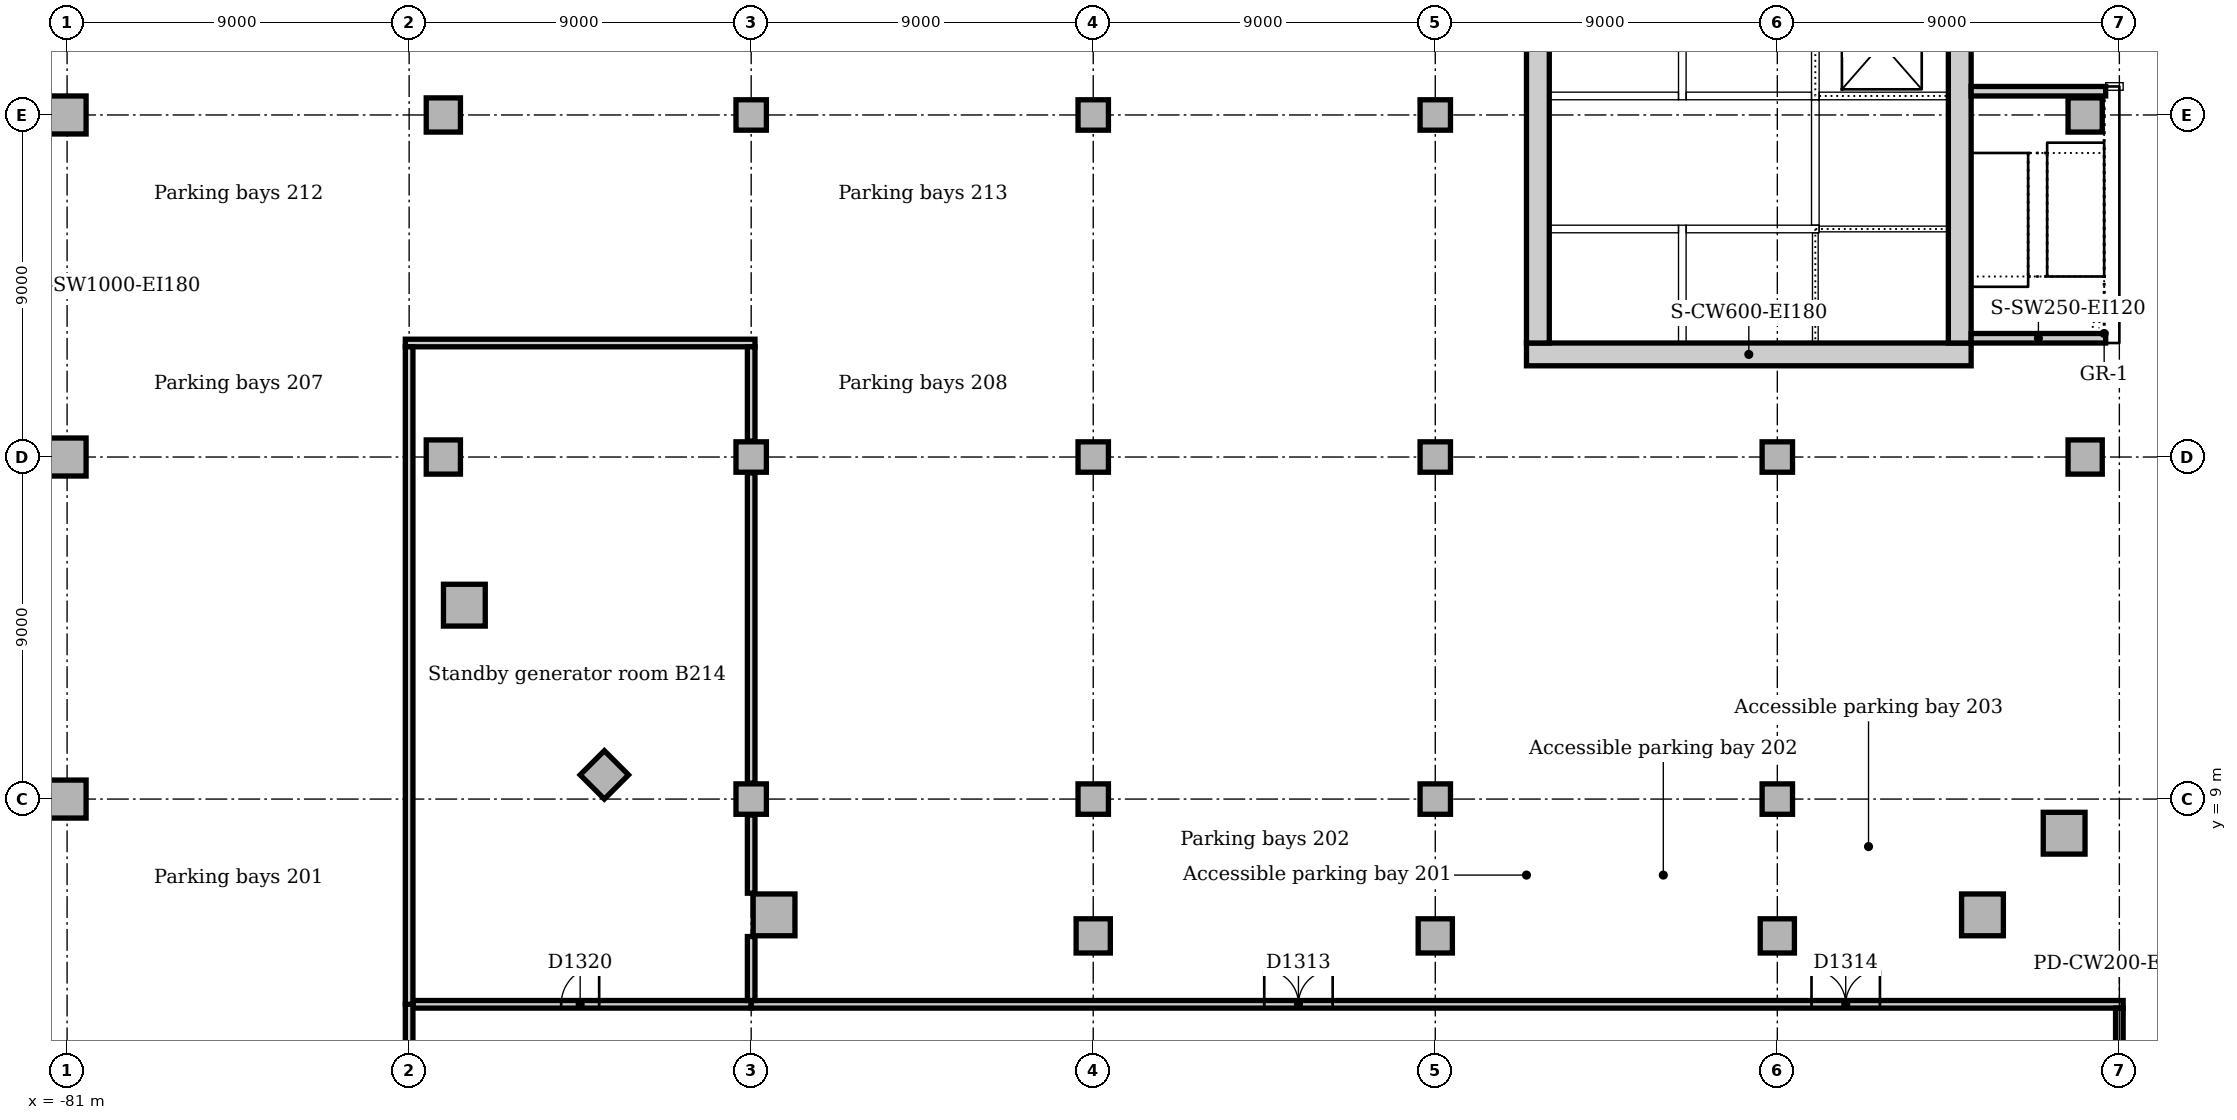
"""IFC4 building model, lengths in metres.
Left out: names, types, materials, properties, quantities, classifications, styles, units other than length and angle.
Written with IfcOpenShell. Run it as: python <this file> out.ifc"""

import sys

from ifc_helpers import new_model, si_unit, direction, frame, frame_2d, origin, origin_2d, place, context, subcontext, project, spatial, rectangle, extrude, element, fill, save


model = new_model("IFC4")
c1 = context("Model", 3, precision=1e-05, world=origin(), true_north=direction((0.0, 1.0)))
c2 = subcontext(c1, "Body", "Model", "MODEL_VIEW")
j1 = project(units=[si_unit("LENGTHUNIT", "METRE"), si_unit("PLANEANGLEUNIT", "RADIAN")], contexts=[c1])
p1 = place(None, origin())
s1 = spatial("IfcSite", under=j1, at=p1, CompositionType="ELEMENT")
p2 = place(p1, origin())
s2 = spatial("IfcBuilding", under=s1, at=p2, CompositionType="ELEMENT")
p3 = place(p2, frame((0.0, 0.0, -9.5)))
s3 = spatial("IfcBuildingStorey", under=s2, at=p3, CompositionType="ELEMENT", Elevation=-9.5)
p4 = place(p3, frame((-42.6, 20.7, 0.0), z_axis=(0.0, 0.0, 1.0), x_axis=(1.0, 0.0, 0.0)))
e1 = element("IfcWall", 1, at=p4, inside=s3, PredefinedType="SOLIDWALL", context=c2, shape_type="SweptSolid", body=[
    extrude(rectangle(XDim=11.7, YDim=0.6, at=frame_2d((5.85, 0.0))), origin(), (0.0, 0.0, 1.0), 4.5),
])
p5 = place(p3, frame((-31.2, 21.0, 0.0), z_axis=(0.0, 0.0, 1.0), x_axis=(0.0, 1.0, 0.0)))
e2 = element("IfcWall", 2, at=p5, inside=s3, PredefinedType="SOLIDWALL", context=c2, shape_type="SweptSolid", body=[
    extrude(rectangle(XDim=9.5, YDim=0.6, at=frame_2d((4.75, 0.0))), origin(), (0.0, 0.0, 1.0), 4.5),
])
p6 = place(p5, frame((5.25, 0.0, 0.0)))
e3 = element("IfcOpeningElement", 3, at=p6, cuts=e2, PredefinedType="OPENING", context=c2, shape_type="SweptSolid", body=[
    extrude(rectangle(XDim=1.0, YDim=2.1, at=frame_2d((0.5, 1.05))), frame((0.0, 0.31, 0.0), z_axis=(0.0, -1.0, 0.0), x_axis=(1.0, 0.0, 0.0)), (0.0, 0.0, 1.0), 0.62),
])
p7 = place(p3, frame((-42.3, 30.5, 0.0), z_axis=(0.0, 0.0, 1.0), x_axis=(0.0, -1.0, 0.0)))
e4 = element("IfcWall", 4, at=p7, inside=s3, PredefinedType="SOLIDWALL", context=c2, shape_type="SweptSolid", body=[
    extrude(rectangle(XDim=9.5, YDim=0.6, at=frame_2d((4.75, 0.0))), origin(), (0.0, 0.0, 1.0), 4.5),
])
p8 = place(p3, frame((-30.9, 21.125, 0.0), z_axis=(0.0, 0.0, 1.0), x_axis=(1.0, 0.0, 0.0)))
e5 = element("IfcWall", 5, at=p8, inside=s3, PredefinedType="SOLIDWALL", context=c2, shape_type="SweptSolid", body=[
    extrude(rectangle(XDim=3.54, YDim=0.25, at=frame_2d((1.77, 0.0))), origin(), (0.0, 0.0, 1.0), 4.5),
])
p9 = place(p3, frame((-27.36, 27.625, 0.0), z_axis=(0.0, 0.0, 1.0), x_axis=(-1.0, 0.0, 0.0)))
e6 = element("IfcWall", 6, at=p9, inside=s3, PredefinedType="SOLIDWALL", context=c2, shape_type="SweptSolid", body=[
    extrude(rectangle(XDim=3.54, YDim=0.25, at=frame_2d((1.77, 0.0))), origin(), (0.0, 0.0, 1.0), 4.5),
])
p10 = place(p9, frame((1.69, 0.0, 0.0)))
e7 = element("IfcOpeningElement", 7, at=p10, cuts=e6, PredefinedType="OPENING", context=c2, shape_type="SweptSolid", body=[
    extrude(rectangle(XDim=1.1, YDim=2.1, at=frame_2d((0.55, 1.05))), frame((0.0, 0.135, 0.0), z_axis=(0.0, -1.0, 0.0), x_axis=(1.0, 0.0, 0.0)), (0.0, 0.0, 1.0), 0.27),
])
for number, where, z_axis, x_axis in (
    (8, (-62.398, 5.953, 0.0), (0.0, 0.0, 1.0), (1.0, 0.0, 0.0)),
    (9, (-30.602, 5.953, 0.0), (0.0, 0.0, 1.0), (1.0, 0.0, 0.0)),
    (10, (-28.453, 8.102, 0.0), (0.0, 0.0, 1.0), (1.0, 0.0, 0.0)),
    (11, (-70.547, 14.102, 0.0), (0.0, 0.0, 1.0), (1.0, 0.0, 0.0)),
):
    element("IfcColumn", number, at=place(p3, frame(where, z_axis=z_axis, x_axis=x_axis)), inside=s3, PredefinedType="COLUMN", context=c2, shape_type="SweptSolid", body=[
        extrude(rectangle(XDim=1.1, YDim=1.1, at=origin_2d()), origin(), (0.0, 0.0, 1.0), 4.15),
    ])
for number, where, z_axis, x_axis in (
    (12, (-54.0, 5.4, 0.0), (0.0, 0.0, 1.0), (1.0, 0.0, 0.0)),
    (13, (-45.0, 5.4, 0.0), (0.0, 0.0, 1.0), (1.0, 0.0, 0.0)),
    (14, (-36.0, 5.4, 0.0), (0.0, 0.0, 1.0), (1.0, 0.0, 0.0)),
    (15, (-27.9, 18.0, 0.0), (0.0, 0.0, 1.0), (1.0, 0.0, 0.0)),
):
    element("IfcColumn", number, at=place(p3, frame(where, z_axis=z_axis, x_axis=x_axis)), inside=s3, PredefinedType="COLUMN", context=c2, shape_type="SweptSolid", body=[
        extrude(rectangle(XDim=0.9, YDim=0.9, at=origin_2d()), origin(), (0.0, 0.0, 1.0), 4.15),
    ])
p11 = place(p3, frame((-27.9, 27.0, 0.0), z_axis=(0.0, 0.0, 1.0), x_axis=(1.0, 0.0, 0.0)))
e16 = element("IfcColumn", 16, at=p11, inside=s3, PredefinedType="COLUMN", context=c2, shape_type="SweptSolid", body=[
    extrude(rectangle(XDim=0.9, YDim=0.9, at=origin_2d()), origin(), (0.0, 0.0, 1.0), 4.5),
])
for number, where, z_axis, x_axis in (
    (17, (-71.1, 18.0, 0.0), (0.0, 0.0, 1.0), (1.0, 0.0, 0.0)),
    (18, (-71.1, 27.0, 0.0), (0.0, 0.0, 1.0), (1.0, 0.0, 0.0)),
    (19, (-66.864, 9.636, 0.0), (0.0, 0.0, 1.0), (0.707, 0.707, 0.0)),
):
    element("IfcColumn", number, at=place(p3, frame(where, z_axis=z_axis, x_axis=x_axis)), inside=s3, PredefinedType="COLUMN", context=c2, shape_type="SweptSolid", body=[
        extrude(rectangle(XDim=0.9, YDim=0.9, at=origin_2d()), origin(), (0.0, 0.0, 1.0), 4.15),
    ])
for number, where, z_axis, x_axis in (
    (20, (-63.0, 9.0, 0.0), (0.0, 0.0, 1.0), (1.0, 0.0, 0.0)),
    (21, (-63.0, 18.0, 0.0), (0.0, 0.0, 1.0), (1.0, 0.0, 0.0)),
    (22, (-63.0, 27.0, 0.0), (0.0, 0.0, 1.0), (1.0, 0.0, 0.0)),
    (23, (-54.0, 9.0, 0.0), (0.0, 0.0, 1.0), (1.0, 0.0, 0.0)),
    (24, (-54.0, 18.0, 0.0), (0.0, 0.0, 1.0), (1.0, 0.0, 0.0)),
    (25, (-54.0, 27.0, 0.0), (0.0, 0.0, 1.0), (1.0, 0.0, 0.0)),
    (26, (-45.0, 9.0, 0.0), (0.0, 0.0, 1.0), (1.0, 0.0, 0.0)),
    (27, (-45.0, 18.0, 0.0), (0.0, 0.0, 1.0), (1.0, 0.0, 0.0)),
    (28, (-45.0, 27.0, 0.0), (0.0, 0.0, 1.0), (1.0, 0.0, 0.0)),
    (29, (-36.0, 9.0, 0.0), (0.0, 0.0, 1.0), (1.0, 0.0, 0.0)),
    (30, (-36.0, 18.0, 0.0), (0.0, 0.0, 1.0), (1.0, 0.0, 0.0)),
):
    element("IfcColumn", number, at=place(p3, frame(where, z_axis=z_axis, x_axis=x_axis)), inside=s3, PredefinedType="COLUMN", context=c2, shape_type="SweptSolid", body=[
        extrude(rectangle(XDim=0.8, YDim=0.8, at=origin_2d()), origin(), (0.0, 0.0, 1.0), 4.15),
    ])
for number, where, z_axis, x_axis in (
    (31, (-81.0, 9.0, 0.0), (0.0, 0.0, 1.0), (1.0, 0.0, 0.0)),
    (32, (-81.0, 18.0, 0.0), (0.0, 0.0, 1.0), (1.0, 0.0, 0.0)),
    (33, (-81.0, 27.0, 0.0), (0.0, 0.0, 1.0), (1.0, 0.0, 0.0)),
):
    element("IfcColumn", number, at=place(p3, frame(where, z_axis=z_axis, x_axis=x_axis)), inside=s3, PredefinedType="COLUMN", context=c2, shape_type="SweptSolid", body=[
        extrude(rectangle(XDim=1.0, YDim=1.0, at=origin_2d()), origin(), (0.0, 0.0, 1.0), 4.15),
    ])
p12 = place(p3, frame((-71.9, 3.6, 0.0), z_axis=(0.0, 0.0, 1.0), x_axis=(1.0, 0.0, 0.0)))
e34 = element("IfcWall", 34, at=p12, inside=s3, PredefinedType="PARTITIONING", context=c2, shape_type="SweptSolid", body=[
    extrude(rectangle(XDim=8.9, YDim=0.2, at=frame_2d((4.45, 0.0))), origin(), (0.0, 0.0, 1.0), 4.15),
])
p13 = place(p12, frame((3.9, 0.0, 0.0)))
e35 = element("IfcOpeningElement", 35, at=p13, cuts=e34, PredefinedType="OPENING", context=c2, shape_type="SweptSolid", body=[
    extrude(rectangle(XDim=1.0, YDim=2.1, at=frame_2d((0.5, 1.05))), frame((0.0, 0.11, 0.0), z_axis=(0.0, -1.0, 0.0), x_axis=(1.0, 0.0, 0.0)), (0.0, 0.0, 1.0), 0.22),
])
p14 = place(p3, frame((-63.0, 3.6, 0.0), z_axis=(0.0, 0.0, 1.0), x_axis=(1.0, 0.0, 0.0)))
e36 = element("IfcWall", 36, at=p14, inside=s3, PredefinedType="PARTITIONING", context=c2, shape_type="SweptSolid", body=[
    extrude(rectangle(XDim=36.1, YDim=0.2, at=frame_2d((18.05, 0.0))), origin(), (0.0, 0.0, 1.0), 4.15),
])
p15 = place(p14, frame((13.5, 0.0, 0.0)))
e37 = element("IfcOpeningElement", 37, at=p15, cuts=e36, PredefinedType="OPENING", context=c2, shape_type="SweptSolid", body=[
    extrude(rectangle(XDim=1.8, YDim=2.1, at=frame_2d((0.9, 1.05))), frame((0.0, 0.11, 0.0), z_axis=(0.0, -1.0, 0.0), x_axis=(1.0, 0.0, 0.0)), (0.0, 0.0, 1.0), 0.22),
])
p16 = place(p14, frame((27.9, 0.0, 0.0)))
e38 = element("IfcOpeningElement", 38, at=p16, cuts=e36, PredefinedType="OPENING", context=c2, shape_type="SweptSolid", body=[
    extrude(rectangle(XDim=1.8, YDim=2.1, at=frame_2d((0.9, 1.05))), frame((0.0, 0.11, 0.0), z_axis=(0.0, -1.0, 0.0), x_axis=(1.0, 0.0, 0.0)), (0.0, 0.0, 1.0), 0.22),
])
p17 = place(p3, frame((-27.0, 0.0, 0.0), z_axis=(0.0, 0.0, 1.0), x_axis=(0.0, 1.0, 0.0)))
e39 = element("IfcWall", 39, at=p17, inside=s3, PredefinedType="PARTITIONING", context=c2, shape_type="SweptSolid", body=[
    extrude(rectangle(XDim=3.5, YDim=0.2, at=frame_2d((1.75, 0.0))), origin(), (0.0, 0.0, 1.0), 4.15),
])
p18 = place(p3, frame((-72.0, 0.52, 0.0), z_axis=(0.0, 0.0, 1.0), x_axis=(0.0, 1.0, 0.0)))
e40 = element("IfcWall", 40, at=p18, inside=s3, PredefinedType="PARTITIONING", context=c2, shape_type="SweptSolid", body=[
    extrude(rectangle(XDim=3.08, YDim=0.2, at=frame_2d((1.54, 0.0))), origin(), (0.0, 0.0, 1.0), 4.15),
])
p19 = place(p3, frame((-72.1, 21.0, 0.0), z_axis=(0.0, 0.0, 1.0), x_axis=(1.0, 0.0, 0.0)))
e41 = element("IfcWall", 41, at=p19, inside=s3, PredefinedType="PARTITIONING", context=c2, shape_type="SweptSolid", body=[
    extrude(rectangle(XDim=9.2, YDim=0.2, at=frame_2d((4.6, 0.0))), origin(), (0.0, 0.0, 1.0), 4.15),
])
p20 = place(p3, frame((-63.0, 3.7, 0.0), z_axis=(0.0, 0.0, 1.0), x_axis=(0.0, 1.0, 0.0)))
e42 = element("IfcWall", 42, at=p20, inside=s3, PredefinedType="PARTITIONING", context=c2, shape_type="SweptSolid", body=[
    extrude(rectangle(XDim=1.683, YDim=0.2, at=frame_2d((0.842, 0.0))), origin(), (0.0, 0.0, 1.0), 4.15),
])
p21 = place(p3, frame((-63.0, 6.523, 0.0), z_axis=(0.0, 0.0, 1.0), x_axis=(0.0, 1.0, 0.0)))
e43 = element("IfcWall", 43, at=p21, inside=s3, PredefinedType="PARTITIONING", context=c2, shape_type="SweptSolid", body=[
    extrude(rectangle(XDim=2.057, YDim=0.2, at=frame_2d((1.028, 0.0))), origin(), (0.0, 0.0, 1.0), 4.15),
])
p22 = place(p3, frame((-63.0, 9.42, 0.0), z_axis=(0.0, 0.0, 1.0), x_axis=(0.0, 1.0, 0.0)))
e44 = element("IfcWall", 44, at=p22, inside=s3, PredefinedType="PARTITIONING", context=c2, shape_type="SweptSolid", body=[
    extrude(rectangle(XDim=8.16, YDim=0.2, at=frame_2d((4.08, 0.0))), origin(), (0.0, 0.0, 1.0), 4.15),
])
p23 = place(p3, frame((-63.0, 18.42, 0.0), z_axis=(0.0, 0.0, 1.0), x_axis=(0.0, 1.0, 0.0)))
e45 = element("IfcWall", 45, at=p23, inside=s3, PredefinedType="PARTITIONING", context=c2, shape_type="SweptSolid", body=[
    extrude(rectangle(XDim=2.48, YDim=0.2, at=frame_2d((1.24, 0.0))), origin(), (0.0, 0.0, 1.0), 4.15),
])
p24 = place(p3, frame((-72.0, 3.6, 0.0), z_axis=(0.0, 0.0, 1.0), x_axis=(0.0, 1.0, 0.0)))
e46 = element("IfcWall", 46, at=p24, inside=s3, PredefinedType="PARTITIONING", context=c2, shape_type="SweptSolid", body=[
    extrude(rectangle(XDim=17.3, YDim=0.2, at=frame_2d((8.65, 0.0))), origin(), (0.0, 0.0, 1.0), 4.15),
])
p25 = place(p3, frame((-38.5, 21.0, 0.0), z_axis=(0.0, 0.0, 1.0), x_axis=(0.0, 1.0, 0.0)))
e47 = element("IfcWall", 47, at=p25, inside=s3, PredefinedType="SOLIDWALL", context=c2, shape_type="SweptSolid", body=[
    extrude(rectangle(XDim=3.1, YDim=0.2, at=frame_2d((1.55, 0.0))), origin(), (0.0, 0.0, 1.0), 4.5),
])
p26 = place(p3, frame((-38.6, 24.0, 0.0), z_axis=(0.0, 0.0, 1.0), x_axis=(-1.0, 0.0, 0.0)))
e48 = element("IfcWall", 48, at=p26, inside=s3, PredefinedType="SOLIDWALL", context=c2, shape_type="SweptSolid", body=[
    extrude(rectangle(XDim=3.4, YDim=0.2, at=frame_2d((1.7, 0.0))), origin(), (0.0, 0.0, 1.0), 4.5),
])
p27 = place(p3, frame((-34.9, 24.0, 0.0), z_axis=(0.0, 0.0, 1.0), x_axis=(-1.0, 0.0, 0.0)))
e49 = element("IfcWall", 49, at=p27, inside=s3, PredefinedType="SOLIDWALL", context=c2, shape_type="SweptSolid", body=[
    extrude(rectangle(XDim=3.5, YDim=0.2, at=frame_2d((1.75, 0.0))), origin(), (0.0, 0.0, 1.0), 4.5),
])
p28 = place(p3, frame((-38.5, 27.4, 0.0), z_axis=(0.0, 0.0, 1.0), x_axis=(0.0, 1.0, 0.0)))
e50 = element("IfcWall", 50, at=p28, inside=s3, PredefinedType="SOLIDWALL", context=c2, shape_type="SweptSolid", body=[
    extrude(rectangle(XDim=2.85, YDim=0.2, at=frame_2d((1.425, 0.0))), origin(), (0.0, 0.0, 1.0), 4.5),
])
p29 = place(p3, frame((-42.0, 27.5, 0.0), z_axis=(0.0, 0.0, 1.0), x_axis=(1.0, 0.0, 0.0)))
e51 = element("IfcWall", 51, at=p29, inside=s3, PredefinedType="SOLIDWALL", context=c2, shape_type="SweptSolid", body=[
    extrude(rectangle(XDim=3.4, YDim=0.2, at=frame_2d((1.7, 0.0))), origin(), (0.0, 0.0, 1.0), 4.5),
])
p30 = place(p3, frame((-35.0, 27.4, 0.0), z_axis=(0.0, 0.0, 1.0), x_axis=(0.0, 1.0, 0.0)))
e52 = element("IfcWall", 52, at=p30, inside=s3, PredefinedType="SOLIDWALL", context=c2, shape_type="SweptSolid", body=[
    extrude(rectangle(XDim=2.85, YDim=0.2, at=frame_2d((1.425, 0.0))), origin(), (0.0, 0.0, 1.0), 4.5),
])
p31 = place(p3, frame((-38.4, 27.5, 0.0), z_axis=(0.0, 0.0, 1.0), x_axis=(1.0, 0.0, 0.0)))
e53 = element("IfcWall", 53, at=p31, inside=s3, PredefinedType="SOLIDWALL", context=c2, shape_type="SweptSolid", body=[
    extrude(rectangle(XDim=3.3, YDim=0.2, at=frame_2d((1.65, 0.0))), origin(), (0.0, 0.0, 1.0), 4.5),
])
p32 = place(p3, frame((-34.9, 27.5, 0.0), z_axis=(0.0, 0.0, 1.0), x_axis=(1.0, 0.0, 0.0)))
e54 = element("IfcWall", 54, at=p32, inside=s3, PredefinedType="SOLIDWALL", context=c2, shape_type="SweptSolid", body=[
    extrude(rectangle(XDim=3.4, YDim=0.2, at=frame_2d((1.7, 0.0))), origin(), (0.0, 0.0, 1.0), 4.5),
])
p33 = place(p32, frame((1.1, 0.0, 0.0)))
e55 = element("IfcOpeningElement", 55, at=p33, cuts=e54, PredefinedType="OPENING", context=c2, shape_type="SweptSolid", body=[
    extrude(rectangle(XDim=1.1, YDim=2.1, at=frame_2d((0.55, 1.05))), frame((0.0, 0.11, 0.0), z_axis=(0.0, -1.0, 0.0), x_axis=(1.0, 0.0, 0.0)), (0.0, 0.0, 1.0), 0.22),
])
p34 = place(p3, frame((-35.0, 24.1, 0.0), z_axis=(0.0, 0.0, 1.0), x_axis=(0.0, 1.0, 0.0)))
e56 = element("IfcWall", 56, at=p34, inside=s3, PredefinedType="SOLIDWALL", context=c2, shape_type="SweptSolid", body=[
    extrude(rectangle(XDim=3.3, YDim=0.2, at=frame_2d((1.65, 0.0))), origin(), (0.0, 0.0, 1.0), 4.5),
])
p35 = place(p3, frame((-27.36, 27.75, 0.0), z_axis=(0.0, 0.0, 1.0), x_axis=(1.0, 0.0, 0.0)))
e57 = element("IfcWall", 57, at=p35, inside=s3, PredefinedType="SOLIDWALL", context=c2, shape_type="SweptSolid", body=[
    extrude(rectangle(XDim=0.46, YDim=0.2, at=frame_2d((0.23, 0.0))), origin(), (0.0, 0.0, 1.0), 4.5),
])
p36 = place(p3, frame((-35.0, 21.0, 0.0), z_axis=(0.0, 0.0, 1.0), x_axis=(0.0, 1.0, 0.0)))
e58 = element("IfcWall", 58, at=p36, inside=s3, PredefinedType="SOLIDWALL", context=c2, shape_type="SweptSolid", body=[
    extrude(rectangle(XDim=2.9, YDim=0.15, at=frame_2d((1.45, 0.0))), origin(), (0.0, 0.0, 1.0), 4.5),
])
p37 = place(p3, frame((-31.5, 24.0, 0.0), z_axis=(0.0, 0.0, 1.0), x_axis=(-1.0, 0.0, 0.0)))
e59 = element("IfcWall", 59, at=p37, inside=s3, PredefinedType="SOLIDWALL", context=c2, shape_type="SweptSolid", body=[
    extrude(rectangle(XDim=3.4, YDim=0.15, at=frame_2d((1.7, 0.0))), origin(), (0.0, 0.0, 1.0), 4.5),
])
p38 = place(p15, origin())
e60 = element("IfcDoor", 60, at=p38, inside=s3, OperationType="DOUBLE_DOOR_SINGLE_SWING", PredefinedType="DOOR", context=c2, shape_type="SweptSolid", body=[
    extrude(rectangle(XDim=1.8, YDim=2.1, at=frame_2d((0.9, 1.05))), frame((0.0, 0.025, 0.0), z_axis=(0.0, -1.0, 0.0), x_axis=(1.0, 0.0, 0.0)), (0.0, 0.0, 1.0), 0.05),
])
fill(e37, e60)
p39 = place(p16, origin())
e61 = element("IfcDoor", 61, at=p39, inside=s3, OperationType="DOUBLE_DOOR_SINGLE_SWING", PredefinedType="DOOR", context=c2, shape_type="SweptSolid", body=[
    extrude(rectangle(XDim=1.8, YDim=2.1, at=frame_2d((0.9, 1.05))), frame((0.0, 0.025, 0.0), z_axis=(0.0, -1.0, 0.0), x_axis=(1.0, 0.0, 0.0)), (0.0, 0.0, 1.0), 0.05),
])
fill(e38, e61)
p40 = place(p13, origin())
e62 = element("IfcDoor", 62, at=p40, inside=s3, OperationType="SINGLE_SWING_RIGHT", PredefinedType="DOOR", context=c2, shape_type="SweptSolid", body=[
    extrude(rectangle(XDim=1.0, YDim=2.1, at=frame_2d((0.5, 1.05))), frame((0.0, 0.025, 0.0), z_axis=(0.0, -1.0, 0.0), x_axis=(1.0, 0.0, 0.0)), (0.0, 0.0, 1.0), 0.05),
])
fill(e35, e62)
p41 = place(p33, origin())
e63 = element("IfcDoor", 63, at=p41, inside=s3, OperationType="SLIDING_TO_LEFT", PredefinedType="DOOR", context=c2, shape_type="SweptSolid", body=[
    extrude(rectangle(XDim=1.1, YDim=2.1, at=frame_2d((0.55, 1.05))), frame((0.0, 0.025, 0.0), z_axis=(0.0, -1.0, 0.0), x_axis=(1.0, 0.0, 0.0)), (0.0, 0.0, 1.0), 0.05),
])
fill(e55, e63)
p42 = place(p6, frame((1.0, 0.0, 0.0), z_axis=(0.0, 0.0, 1.0), x_axis=(-1.0, 0.0, 0.0)))
e64 = element("IfcDoor", 64, at=p42, inside=s3, OperationType="SINGLE_SWING_LEFT", PredefinedType="DOOR", context=c2, shape_type="SweptSolid", body=[
    extrude(rectangle(XDim=1.0, YDim=2.1, at=frame_2d((0.5, 1.05))), frame((0.0, 0.025, 0.0), z_axis=(0.0, -1.0, 0.0), x_axis=(1.0, 0.0, 0.0)), (0.0, 0.0, 1.0), 0.05),
])
fill(e3, e64)
p43 = place(p10, origin())
e65 = element("IfcDoor", 65, at=p43, inside=s3, OperationType="SINGLE_SWING_RIGHT", PredefinedType="DOOR", context=c2, shape_type="SweptSolid", body=[
    extrude(rectangle(XDim=1.1, YDim=2.1, at=frame_2d((0.55, 1.05))), frame((0.0, 0.025, 0.0), z_axis=(0.0, -1.0, 0.0), x_axis=(1.0, 0.0, 0.0)), (0.0, 0.0, 1.0), 0.05),
])
fill(e7, e65)
save(model, sys.argv[1])
